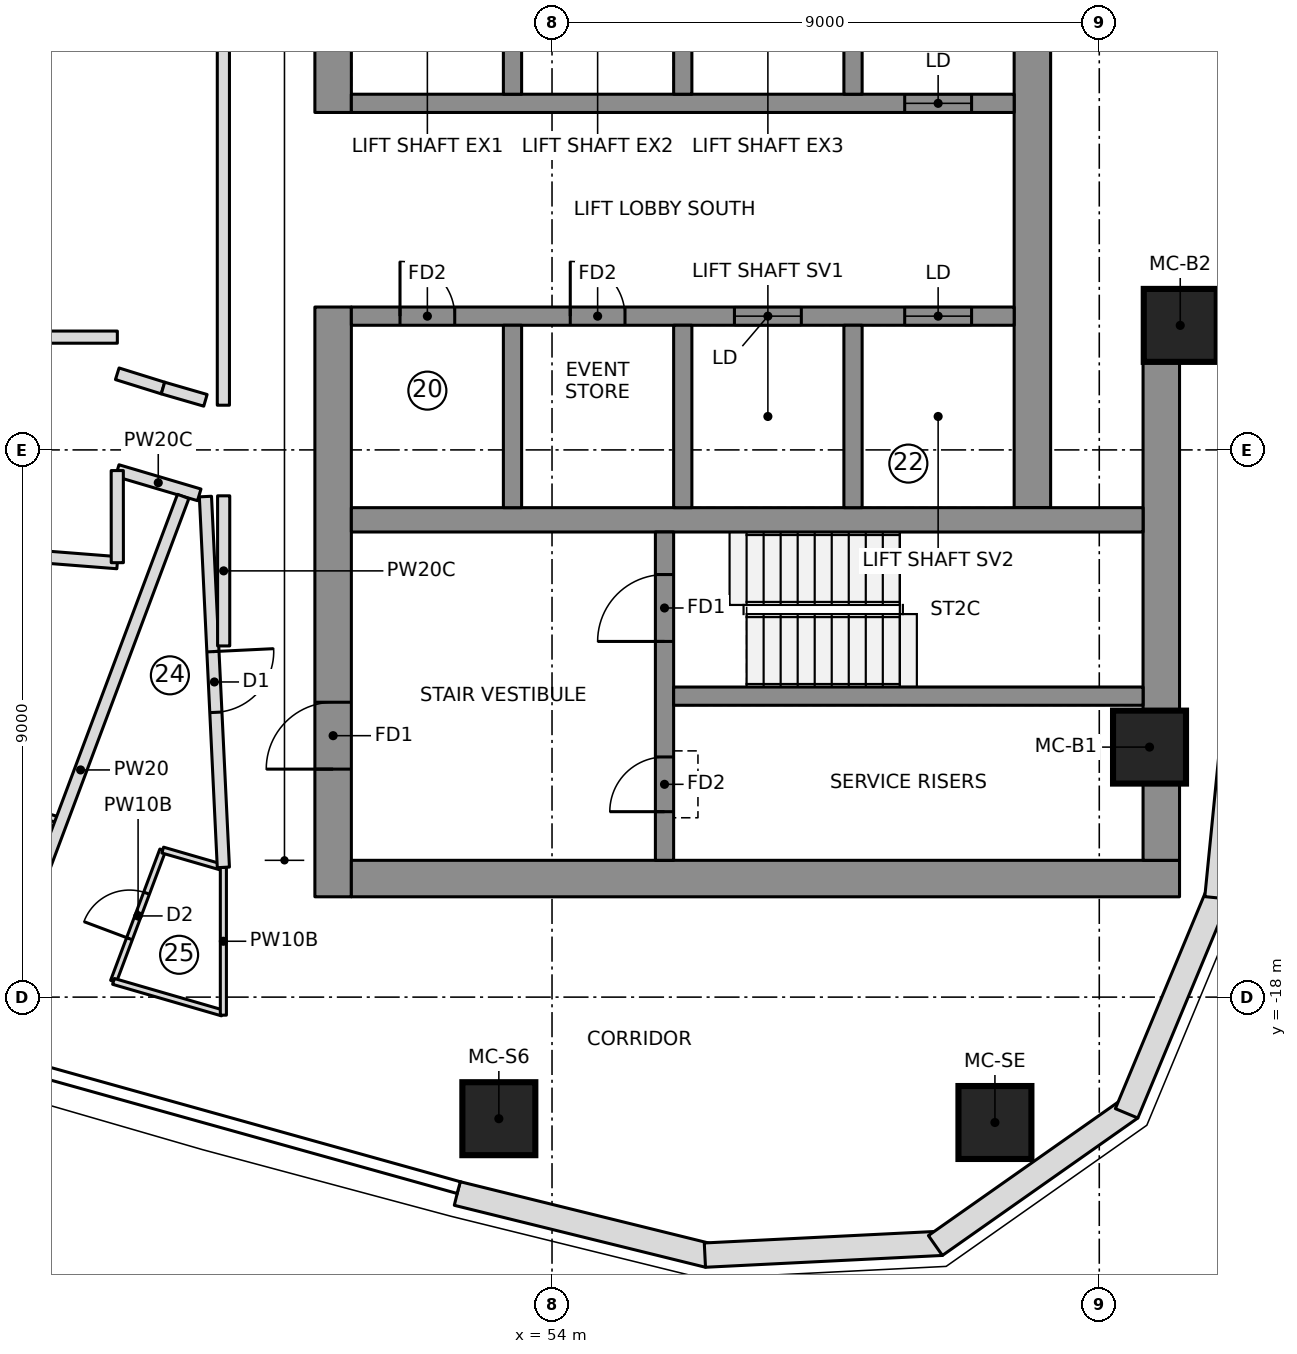
"""IFC4 building model, lengths in metres.
Left out: names, types, materials, properties, quantities, classifications, styles, units other than length and angle.
Written with IfcOpenShell. Run it as: python <this file> out.ifc"""

import sys

from ifc_helpers import new_model, si_unit, direction, frame, frame_2d, origin, origin_2d, place, context, subcontext, project, spatial, polyline, rectangle, outline, extrude, element, fill, save


model = new_model("IFC4")
c1 = context("Model", 3, precision=1e-05, world=origin(), true_north=direction((0.0, 1.0)))
c2 = subcontext(c1, "Body", "Model", "MODEL_VIEW")
j1 = project(units=[si_unit("LENGTHUNIT", "METRE"), si_unit("PLANEANGLEUNIT", "RADIAN")], contexts=[c1])
p1 = place(None, origin())
s1 = spatial("IfcSite", under=j1, at=p1, CompositionType="ELEMENT")
p2 = place(p1, origin())
s2 = spatial("IfcBuilding", under=s1, at=p2, CompositionType="ELEMENT")
p3 = place(p2, frame((0.0, 0.0, 252.75)))
s3 = spatial("IfcBuildingStorey", under=s2, at=p3, CompositionType="ELEMENT", Elevation=252.75)
p4 = place(p3, frame((50.4, -3.45, 0.0), z_axis=(0.0, 0.0, 1.0), x_axis=(0.0, 1.0, 0.0)))
e1 = element("IfcWall", 1, at=p4, inside=s3, PredefinedType="SHEAR", context=c2, shape_type="SweptSolid", body=[
    extrude(rectangle(XDim=6.9, YDim=0.6, at=frame_2d((3.45, 0.0))), origin(), (0.0, 0.0, 1.0), 3.55),
])
p5 = place(p3, frame((50.4, -16.35, 0.0), z_axis=(0.0, 0.0, 1.0), x_axis=(0.0, 1.0, 0.0)))
e2 = element("IfcWall", 2, at=p5, inside=s3, PredefinedType="SHEAR", context=c2, shape_type="SweptSolid", body=[
    extrude(rectangle(XDim=9.7, YDim=0.6, at=frame_2d((4.85, 0.0))), origin(), (0.0, 0.0, 1.0), 3.55),
])
p6 = place(p5, frame((2.1, 0.0, 0.0)))
e3 = element("IfcOpeningElement", 3, at=p6, cuts=e2, PredefinedType="OPENING", context=c2, shape_type="SweptSolid", body=[
    extrude(rectangle(XDim=1.1, YDim=2.1, at=frame_2d((0.55, 1.05))), frame((0.0, 0.31, 0.0), z_axis=(0.0, -1.0, 0.0), x_axis=(1.0, 0.0, 0.0)), (0.0, 0.0, 1.0), 0.62),
])
p7 = place(p3, frame((50.7, -16.05, 0.0), z_axis=(0.0, 0.0, 1.0), x_axis=(1.0, 0.0, 0.0)))
e4 = element("IfcWall", 4, at=p7, inside=s3, PredefinedType="SHEAR", context=c2, shape_type="SweptSolid", body=[
    extrude(rectangle(XDim=13.62, YDim=0.6, at=frame_2d((6.81, 0.0))), origin(), (0.0, 0.0, 1.0), 3.55),
])
p8 = place(p3, frame((64.02, -15.75, 0.0), z_axis=(0.0, 0.0, 1.0), x_axis=(0.0, 1.0, 0.0)))
e5 = element("IfcWall", 5, at=p8, inside=s3, PredefinedType="SHEAR", context=c2, shape_type="SweptSolid", body=[
    extrude(rectangle(XDim=8.248, YDim=0.6, at=frame_2d((4.124, 0.0))), origin(), (0.0, 0.0, 1.0), 3.55),
])
p9 = place(p3, frame((61.9, -9.95, 0.0), z_axis=(0.0, 0.0, 1.0), x_axis=(0.0, 1.0, 0.0)))
e6 = element("IfcWall", 6, at=p9, inside=s3, PredefinedType="SHEAR", context=c2, shape_type="SweptSolid", body=[
    extrude(rectangle(XDim=19.9, YDim=0.6, at=frame_2d((9.95, 0.0))), origin(), (0.0, 0.0, 1.0), 3.55),
])
p10 = place(p3, frame((50.7, -10.15, 0.0), z_axis=(0.0, 0.0, 1.0), x_axis=(1.0, 0.0, 0.0)))
e7 = element("IfcWall", 7, at=p10, inside=s3, PredefinedType="SHEAR", context=c2, shape_type="SweptSolid", body=[
    extrude(rectangle(XDim=13.02, YDim=0.4, at=frame_2d((6.51, 0.0))), origin(), (0.0, 0.0, 1.0), 3.55),
])
p11 = place(p3, frame((50.7, -3.3, 0.0), z_axis=(0.0, 0.0, 1.0), x_axis=(1.0, 0.0, 0.0)))
e8 = element("IfcWall", 8, at=p11, inside=s3, PredefinedType="SHEAR", context=c2, shape_type="SweptSolid", body=[
    extrude(rectangle(XDim=10.9, YDim=0.3, at=frame_2d((5.45, 0.0))), origin(), (0.0, 0.0, 1.0), 3.55),
])
p12 = place(p11, frame((9.1, 0.0, 0.0)))
e9 = element("IfcOpeningElement", 9, at=p12, cuts=e8, PredefinedType="OPENING", context=c2, shape_type="SweptSolid", body=[
    extrude(rectangle(XDim=1.1, YDim=2.1, at=frame_2d((0.55, 1.05))), frame((0.0, 0.16, 0.0), z_axis=(0.0, -1.0, 0.0), x_axis=(1.0, 0.0, 0.0)), (0.0, 0.0, 1.0), 0.32),
])
p13 = place(p3, frame((50.7, -6.8, 0.0), z_axis=(0.0, 0.0, 1.0), x_axis=(1.0, 0.0, 0.0)))
e10 = element("IfcWall", 10, at=p13, inside=s3, PredefinedType="SHEAR", context=c2, shape_type="SweptSolid", body=[
    extrude(rectangle(XDim=10.9, YDim=0.3, at=frame_2d((5.45, 0.0))), origin(), (0.0, 0.0, 1.0), 3.55),
])
p14 = place(p13, frame((6.3, 0.0, 0.0)))
e11 = element("IfcOpeningElement", 11, at=p14, cuts=e10, PredefinedType="OPENING", context=c2, shape_type="SweptSolid", body=[
    extrude(rectangle(XDim=1.1, YDim=2.1, at=frame_2d((0.55, 1.05))), frame((0.0, 0.16, 0.0), z_axis=(0.0, -1.0, 0.0), x_axis=(1.0, 0.0, 0.0)), (0.0, 0.0, 1.0), 0.32),
])
p15 = place(p13, frame((9.1, 0.0, 0.0)))
e12 = element("IfcOpeningElement", 12, at=p15, cuts=e10, PredefinedType="OPENING", context=c2, shape_type="SweptSolid", body=[
    extrude(rectangle(XDim=1.1, YDim=2.1, at=frame_2d((0.55, 1.05))), frame((0.0, 0.16, 0.0), z_axis=(0.0, -1.0, 0.0), x_axis=(1.0, 0.0, 0.0)), (0.0, 0.0, 1.0), 0.32),
])
p16 = place(p13, frame((0.8, 0.0, 0.0)))
e13 = element("IfcOpeningElement", 13, at=p16, cuts=e10, PredefinedType="OPENING", context=c2, shape_type="SweptSolid", body=[
    extrude(rectangle(XDim=0.9, YDim=2.1, at=frame_2d((0.45, 1.05))), frame((0.0, 0.16, 0.0), z_axis=(0.0, -1.0, 0.0), x_axis=(1.0, 0.0, 0.0)), (0.0, 0.0, 1.0), 0.32),
])
p17 = place(p13, frame((3.6, 0.0, 0.0)))
e14 = element("IfcOpeningElement", 14, at=p17, cuts=e10, PredefinedType="OPENING", context=c2, shape_type="SweptSolid", body=[
    extrude(rectangle(XDim=0.9, YDim=2.1, at=frame_2d((0.45, 1.05))), frame((0.0, 0.16, 0.0), z_axis=(0.0, -1.0, 0.0), x_axis=(1.0, 0.0, 0.0)), (0.0, 0.0, 1.0), 0.32),
])
for number, where, z_axis, x_axis in (
    (15, (53.35, -3.15, 0.0), (0.0, 0.0, 1.0), (0.0, 1.0, 0.0)),
    (16, (53.35, -9.95, 0.0), (0.0, 0.0, 1.0), (0.0, 1.0, 0.0)),
    (17, (56.15, -3.15, 0.0), (0.0, 0.0, 1.0), (0.0, 1.0, 0.0)),
    (18, (56.15, -9.95, 0.0), (0.0, 0.0, 1.0), (0.0, 1.0, 0.0)),
    (19, (58.95, -3.15, 0.0), (0.0, 0.0, 1.0), (0.0, 1.0, 0.0)),
    (20, (58.95, -9.95, 0.0), (0.0, 0.0, 1.0), (0.0, 1.0, 0.0)),
):
    element("IfcWall", number, at=place(p3, frame(where, z_axis=z_axis, x_axis=x_axis)), inside=s3, PredefinedType="SHEAR", context=c2, shape_type="SweptSolid", body=[
        extrude(rectangle(XDim=3.0, YDim=0.3, at=frame_2d((1.5, 0.0))), origin(), (0.0, 0.0, 1.0), 3.55),
    ])
p18 = place(p3, frame((55.85, -15.75, 0.0), z_axis=(0.0, 0.0, 1.0), x_axis=(0.0, 1.0, 0.0)))
e21 = element("IfcWall", 21, at=p18, inside=s3, PredefinedType="SHEAR", context=c2, shape_type="SweptSolid", body=[
    extrude(rectangle(XDim=5.4, YDim=0.3, at=frame_2d((2.7, 0.0))), origin(), (0.0, 0.0, 1.0), 3.55),
])
p19 = place(p18, frame((3.6, 0.0, 0.0)))
e22 = element("IfcOpeningElement", 22, at=p19, cuts=e21, PredefinedType="OPENING", context=c2, shape_type="SweptSolid", body=[
    extrude(rectangle(XDim=1.1, YDim=2.1, at=frame_2d((0.55, 1.05))), frame((0.0, 0.16, 0.0), z_axis=(0.0, -1.0, 0.0), x_axis=(1.0, 0.0, 0.0)), (0.0, 0.0, 1.0), 0.32),
])
p20 = place(p18, frame((0.8, 0.0, 0.0)))
e23 = element("IfcOpeningElement", 23, at=p20, cuts=e21, PredefinedType="OPENING", context=c2, shape_type="SweptSolid", body=[
    extrude(rectangle(XDim=0.9, YDim=2.1, at=frame_2d((0.45, 1.05))), frame((0.0, 0.16, 0.0), z_axis=(0.0, -1.0, 0.0), x_axis=(1.0, 0.0, 0.0)), (0.0, 0.0, 1.0), 0.32),
])
p21 = place(p3, frame((56.0, -13.05, 0.0), z_axis=(0.0, 0.0, 1.0), x_axis=(1.0, 0.0, 0.0)))
e24 = element("IfcWall", 24, at=p21, inside=s3, PredefinedType="SHEAR", context=c2, shape_type="SweptSolid", body=[
    extrude(rectangle(XDim=7.72, YDim=0.3, at=frame_2d((3.86, 0.0))), origin(), (0.0, 0.0, 1.0), 3.55),
])
for number, where, z_axis, x_axis in (
    (25, (53.125, -20.0, 0.0), (0.0, 0.0, 1.0), (1.0, 0.0, 0.0)),
    (26, (61.284, -20.062, 0.0), (0.0, 0.0, 1.0), (1.0, 0.0, 0.0)),
    (27, (63.826, -13.888, 0.0), (0.0, 0.0, 1.0), (1.0, 0.0, 0.0)),
    (28, (64.332, -6.952, 0.0), (0.0, 0.0, 1.0), (1.0, 0.0, 0.0)),
):
    element("IfcColumn", number, at=place(p3, frame(where, z_axis=z_axis, x_axis=x_axis)), inside=s3, PredefinedType="COLUMN", context=c2, shape_type="SweptSolid", body=[
        extrude(rectangle(XDim=1.2, YDim=1.2, at=origin_2d()), origin(), (0.0, 0.0, 1.0), 3.55),
    ])
p22 = place(p3, frame((52.441, -21.23, 0.0), z_axis=(0.0, 0.0, 1.0), x_axis=(0.970902342456, -0.23947576373, 0.0)))
e29 = element("IfcWall", 29, at=p22, inside=s3, PredefinedType="NOTDEFINED", context=c2, shape_type="SweptSolid", body=[
    extrude(outline(polyline([(0.0, -0.2), (4.255, -0.2), (4.197, 0.2), (0.0, 0.2), (0.0, -0.2)])), origin(), (0.0, 0.0, 1.0), 3.25),
])
p23 = place(p3, frame((56.543, -22.242, 0.0), z_axis=(0.0, 0.0, 1.0), x_axis=(0.998758875872, 0.049806705046, 0.0)))
e30 = element("IfcWall", 30, at=p23, inside=s3, PredefinedType="NOTDEFINED", context=c2, shape_type="SweptSolid", body=[
    extrude(outline(polyline([(-0.029, -0.2), (3.871, -0.2), (3.756, 0.2), (0.029, 0.2), (-0.029, -0.2)])), origin(), (0.0, 0.0, 1.0), 3.25),
])
p24 = place(p3, frame((60.352, -22.052, 0.0), z_axis=(0.0, 0.0, 1.0), x_axis=(0.817942545532, 0.575299915009, 0.0)))
e31 = element("IfcWall", 31, at=p24, inside=s3, PredefinedType="NOTDEFINED", context=c2, shape_type="SweptSolid", body=[
    extrude(outline(polyline([(-0.058, -0.2), (3.871, -0.2), (3.756, 0.2), (0.058, 0.2), (-0.058, -0.2)])), origin(), (0.0, 0.0, 1.0), 3.25),
])
p25 = place(p3, frame((63.471, -19.858, 0.0), z_axis=(0.0, 0.0, 1.0), x_axis=(0.3844335483, 0.923152667191, 0.0)))
e32 = element("IfcWall", 32, at=p25, inside=s3, PredefinedType="NOTDEFINED", context=c2, shape_type="SweptSolid", body=[
    extrude(outline(polyline([(-0.058, -0.2), (3.843, -0.2), (3.784, 0.2), (0.058, 0.2), (-0.058, -0.2)])), origin(), (0.0, 0.0, 1.0), 3.25),
])
p26 = place(p3, frame((64.938, -16.337, 0.0), z_axis=(0.0, 0.0, 1.0), x_axis=(0.098718218066, 0.995115427185, 0.0)))
e33 = element("IfcWall", 33, at=p26, inside=s3, PredefinedType="NOTDEFINED", context=c2, shape_type="SweptSolid", body=[
    extrude(outline(polyline([(-0.03, -0.2), (4.096, -0.2), (4.09, 0.2), (0.03, 0.2), (-0.03, -0.2)])), origin(), (0.0, 0.0, 1.0), 3.25),
])
p27 = place(p3, frame((46.85, -9.34, 0.0), z_axis=(0.0, 0.0, 1.0), x_axis=(0.958866391875, -0.283857785753, 0.0)))
e34 = element("IfcWall", 34, at=p27, inside=s3, PredefinedType="PARTITIONING", context=c2, shape_type="SweptSolid", body=[
    extrude(rectangle(XDim=1.406, YDim=0.2, at=frame_2d((0.703, 0.0))), origin(), (0.0, 0.0, 1.0), 3.15),
])
p28 = place(p3, frame((45.499, -14.973, 0.0), z_axis=(0.0, 0.0, 1.0), x_axis=(0.960560469191, -0.278071186978, 0.0)))
e35 = element("IfcWall", 35, at=p28, inside=s3, PredefinedType="PARTITIONING", context=c2, shape_type="SweptSolid", body=[
    extrude(rectangle(XDim=0.452, YDim=0.1, at=frame_2d((0.226, 0.0))), origin(), (0.0, 0.0, 1.0), 3.15),
])
p29 = place(p3, frame((44.56, -18.762, 0.0), z_axis=(0.0, 0.0, 1.0), x_axis=(0.35112901071, 0.936327089129, 0.0)))
e36 = element("IfcWall", 36, at=p29, inside=s3, PredefinedType="PARTITIONING", context=c2, shape_type="SweptSolid", body=[
    extrude(rectangle(XDim=9.608, YDim=0.2, at=frame_2d((4.804, 0.0))), origin(), (0.0, 0.0, 1.0), 3.15),
])
p30 = place(p3, frame((46.788, -17.741, 0.0), z_axis=(0.0, 0.0, 1.0), x_axis=(0.351158236187, 0.936316128857, 0.0)))
e37 = element("IfcWall", 37, at=p30, inside=s3, PredefinedType="PARTITIONING", context=c2, shape_type="SweptSolid", body=[
    extrude(rectangle(XDim=2.307, YDim=0.1, at=frame_2d((1.153, 0.0))), origin(), (0.0, 0.0, 1.0), 3.15),
])
p31 = place(p30, frame((0.75, 0.0, 0.0)))
e38 = element("IfcOpeningElement", 38, at=p31, cuts=e37, PredefinedType="OPENING", context=c2, shape_type="SweptSolid", body=[
    extrude(rectangle(XDim=0.8, YDim=2.1, at=frame_2d((0.4, 1.05))), frame((0.0, 0.06, 0.0), z_axis=(0.0, -1.0, 0.0), x_axis=(1.0, 0.0, 0.0)), (0.0, 0.0, 1.0), 0.12),
])
p32 = place(p3, frame((47.598, -15.582, 0.0), z_axis=(0.0, 0.0, 1.0), x_axis=(0.960468222897, -0.278389642057, 0.0)))
e39 = element("IfcWall", 39, at=p32, inside=s3, PredefinedType="PARTITIONING", context=c2, shape_type="SweptSolid", body=[
    extrude(rectangle(XDim=1.019, YDim=0.1, at=frame_2d((0.51, 0.0))), origin(), (0.0, 0.0, 1.0), 3.15),
])
p33 = place(p3, frame((48.578, -18.26, 0.0), z_axis=(0.0, 0.0, 1.0), x_axis=(-0.960473980386, 0.278369777458, 0.0)))
e40 = element("IfcWall", 40, at=p33, inside=s3, PredefinedType="PARTITIONING", context=c2, shape_type="SweptSolid", body=[
    extrude(rectangle(XDim=1.864, YDim=0.1, at=frame_2d((0.932, 0.0))), origin(), (0.0, 0.0, 1.0), 3.15),
])
p34 = place(p3, frame((47.602, -7.982, 0.0), z_axis=(0.0, 0.0, 1.0), x_axis=(-0.95461224237, 0.297851417181, 0.0)))
e41 = element("IfcWall", 41, at=p34, inside=s3, PredefinedType="PARTITIONING", context=c2, shape_type="SweptSolid", body=[
    extrude(rectangle(XDim=0.788, YDim=0.2, at=frame_2d((0.394, 0.0))), origin(), (0.0, 0.0, 1.0), 3.15),
])
p35 = place(p3, frame((48.595, -15.866, 0.0), z_axis=(0.0, 0.0, 1.0), x_axis=(0.0, -1.0, 0.0)))
e42 = element("IfcWall", 42, at=p35, inside=s3, PredefinedType="PARTITIONING", context=c2, shape_type="SweptSolid", body=[
    extrude(rectangle(XDim=2.431, YDim=0.1, at=frame_2d((1.215, 0.0))), origin(), (0.0, 0.0, 1.0), 3.15),
])
p36 = place(p3, frame((48.3, -8.185, 0.0), z_axis=(0.0, 0.0, 1.0), x_axis=(-0.960439023181, 0.278490363839, 0.0)))
e43 = element("IfcWall", 43, at=p36, inside=s3, PredefinedType="PARTITIONING", context=c2, shape_type="SweptSolid", body=[
    extrude(rectangle(XDim=0.727, YDim=0.2, at=frame_2d((0.363, 0.0))), origin(), (0.0, 0.0, 1.0), 3.15),
])
p37 = place(p3, frame((43.158, -10.565, 0.0), z_axis=(0.0, 0.0, 1.0), x_axis=(0.996940593543, -0.078162989617, 0.0)))
e44 = element("IfcWall", 44, at=p37, inside=s3, PredefinedType="PARTITIONING", context=c2, shape_type="SweptSolid", body=[
    extrude(rectangle(XDim=3.704, YDim=0.2, at=frame_2d((1.852, 0.0))), origin(), (0.0, 0.0, 1.0), 3.15),
])
p38 = place(p37, frame((1.327, 0.0, 0.0)))
e45 = element("IfcOpeningElement", 45, at=p38, cuts=e44, PredefinedType="OPENING", context=c2, shape_type="SweptSolid", body=[
    extrude(rectangle(XDim=1.0, YDim=2.1, at=frame_2d((0.5, 1.05))), frame((0.0, 0.11, 0.0), z_axis=(0.0, -1.0, 0.0), x_axis=(1.0, 0.0, 0.0)), (0.0, 0.0, 1.0), 0.22),
])
p39 = place(p3, frame((48.3, -9.767, 0.0), z_axis=(0.0, 0.0, 1.0), x_axis=(0.048302241024, -0.998832765538, 0.0)))
e46 = element("IfcWall", 46, at=p39, inside=s3, PredefinedType="PARTITIONING", context=c2, shape_type="SweptSolid", body=[
    extrude(rectangle(XDim=6.106, YDim=0.2, at=frame_2d((3.053, 0.0))), origin(), (0.0, 0.0, 1.0), 3.15),
])
p40 = place(p39, frame((2.553, 0.0, 0.0)))
e47 = element("IfcOpeningElement", 47, at=p40, cuts=e46, PredefinedType="OPENING", context=c2, shape_type="SweptSolid", body=[
    extrude(rectangle(XDim=1.0, YDim=2.1, at=frame_2d((0.5, 1.05))), frame((0.0, 0.11, 0.0), z_axis=(0.0, -1.0, 0.0), x_axis=(1.0, 0.0, 0.0)), (0.0, 0.0, 1.0), 0.22),
])
p41 = place(p3, frame((48.595, 8.265, 0.0), z_axis=(0.0, 0.0, 1.0), x_axis=(0.0, -1.0, 0.0)))
e48 = element("IfcWall", 48, at=p41, inside=s3, PredefinedType="PARTITIONING", context=c2, shape_type="SweptSolid", body=[
    extrude(rectangle(XDim=16.53, YDim=0.2, at=frame_2d((8.265, 0.0))), origin(), (0.0, 0.0, 1.0), 3.15),
])
p42 = place(p3, frame((46.852, -7.145, 0.0), z_axis=(0.0, 0.0, 1.0), x_axis=(-0.99999999156, 0.000129920747, 0.0)))
e49 = element("IfcWall", 49, at=p42, inside=s3, PredefinedType="PARTITIONING", context=c2, shape_type="SweptSolid", body=[
    extrude(rectangle(XDim=1.879, YDim=0.2, at=frame_2d((0.939, 0.0))), origin(), (0.0, 0.0, 1.0), 3.15),
])
p43 = place(p3, frame((46.851, -10.855, 0.0), z_axis=(0.0, 0.0, 1.0), x_axis=(-0.000644641284, 0.999999792219, 0.0)))
e50 = element("IfcWall", 50, at=p43, inside=s3, PredefinedType="PARTITIONING", context=c2, shape_type="SweptSolid", body=[
    extrude(rectangle(XDim=1.515, YDim=0.2, at=frame_2d((0.757, 0.0))), origin(), (0.0, 0.0, 1.0), 3.15),
])
p44 = place(p3, frame((48.6, -12.224, 0.0), z_axis=(0.0, 0.0, 1.0), x_axis=(0.0, 1.0, 0.0)))
e51 = element("IfcWall", 51, at=p44, inside=s3, PredefinedType="PARTITIONING", context=c2, shape_type="SweptSolid", body=[
    extrude(rectangle(XDim=2.469, YDim=0.2, at=frame_2d((1.234, 0.0))), origin(), (0.0, 0.0, 1.0), 3.15),
])
p45 = place(p31, origin())
e52 = element("IfcDoor", 52, at=p45, inside=s3, OperationType="SINGLE_SWING_LEFT", PredefinedType="DOOR", context=c2, shape_type="SweptSolid", body=[
    extrude(rectangle(XDim=0.8, YDim=2.1, at=frame_2d((0.4, 1.05))), frame((0.0, 0.025, 0.0), z_axis=(0.0, -1.0, 0.0), x_axis=(1.0, 0.0, 0.0)), (0.0, 0.0, 1.0), 0.05),
])
fill(e38, e52)
p46 = place(p40, origin())
e53 = element("IfcDoor", 53, at=p46, inside=s3, OperationType="SINGLE_SWING_LEFT", PredefinedType="DOOR", context=c2, shape_type="SweptSolid", body=[
    extrude(rectangle(XDim=1.0, YDim=2.1, at=frame_2d((0.5, 1.05))), frame((0.0, 0.025, 0.0), z_axis=(0.0, -1.0, 0.0), x_axis=(1.0, 0.0, 0.0)), (0.0, 0.0, 1.0), 0.05),
])
fill(e47, e53)
p47 = place(p12, origin())
e54 = element("IfcDoor", 54, at=p47, inside=s3, OperationType="DOUBLE_DOOR_SLIDING", PredefinedType="DOOR", context=c2, shape_type="SweptSolid", body=[
    extrude(rectangle(XDim=1.1, YDim=2.1, at=frame_2d((0.55, 1.05))), frame((0.0, 0.025, 0.0), z_axis=(0.0, -1.0, 0.0), x_axis=(1.0, 0.0, 0.0)), (0.0, 0.0, 1.0), 0.05),
])
fill(e9, e54)
p48 = place(p14, origin())
e55 = element("IfcDoor", 55, at=p48, inside=s3, OperationType="DOUBLE_DOOR_SLIDING", PredefinedType="DOOR", context=c2, shape_type="SweptSolid", body=[
    extrude(rectangle(XDim=1.1, YDim=2.1, at=frame_2d((0.55, 1.05))), frame((0.0, 0.025, 0.0), z_axis=(0.0, -1.0, 0.0), x_axis=(1.0, 0.0, 0.0)), (0.0, 0.0, 1.0), 0.05),
])
fill(e11, e55)
p49 = place(p15, origin())
e56 = element("IfcDoor", 56, at=p49, inside=s3, OperationType="DOUBLE_DOOR_SLIDING", PredefinedType="DOOR", context=c2, shape_type="SweptSolid", body=[
    extrude(rectangle(XDim=1.1, YDim=2.1, at=frame_2d((0.55, 1.05))), frame((0.0, 0.025, 0.0), z_axis=(0.0, -1.0, 0.0), x_axis=(1.0, 0.0, 0.0)), (0.0, 0.0, 1.0), 0.05),
])
fill(e12, e56)
p50 = place(p19, origin())
e57 = element("IfcDoor", 57, at=p50, inside=s3, OperationType="SINGLE_SWING_RIGHT", PredefinedType="DOOR", context=c2, shape_type="SweptSolid", body=[
    extrude(rectangle(XDim=1.1, YDim=2.1, at=frame_2d((0.55, 1.05))), frame((0.0, 0.025, 0.0), z_axis=(0.0, -1.0, 0.0), x_axis=(1.0, 0.0, 0.0)), (0.0, 0.0, 1.0), 0.05),
])
fill(e22, e57)
p51 = place(p6, origin())
e58 = element("IfcDoor", 58, at=p51, inside=s3, OperationType="SINGLE_SWING_RIGHT", PredefinedType="DOOR", context=c2, shape_type="SweptSolid", body=[
    extrude(rectangle(XDim=1.1, YDim=2.1, at=frame_2d((0.55, 1.05))), frame((0.0, 0.025, 0.0), z_axis=(0.0, -1.0, 0.0), x_axis=(1.0, 0.0, 0.0)), (0.0, 0.0, 1.0), 0.05),
])
fill(e3, e58)
p52 = place(p20, origin())
e59 = element("IfcDoor", 59, at=p52, inside=s3, OperationType="SINGLE_SWING_LEFT", PredefinedType="DOOR", context=c2, shape_type="SweptSolid", body=[
    extrude(rectangle(XDim=0.9, YDim=2.1, at=frame_2d((0.45, 1.05))), frame((0.0, 0.025, 0.0), z_axis=(0.0, -1.0, 0.0), x_axis=(1.0, 0.0, 0.0)), (0.0, 0.0, 1.0), 0.05),
])
fill(e23, e59)
p53 = place(p16, origin())
e60 = element("IfcDoor", 60, at=p53, inside=s3, OperationType="SINGLE_SWING_LEFT", PredefinedType="DOOR", context=c2, shape_type="SweptSolid", body=[
    extrude(rectangle(XDim=0.9, YDim=2.1, at=frame_2d((0.45, 1.05))), frame((0.0, 0.025, 0.0), z_axis=(0.0, -1.0, 0.0), x_axis=(1.0, 0.0, 0.0)), (0.0, 0.0, 1.0), 0.05),
])
fill(e13, e60)
p54 = place(p17, origin())
e61 = element("IfcDoor", 61, at=p54, inside=s3, OperationType="SINGLE_SWING_LEFT", PredefinedType="DOOR", context=c2, shape_type="SweptSolid", body=[
    extrude(rectangle(XDim=0.9, YDim=2.1, at=frame_2d((0.45, 1.05))), frame((0.0, 0.025, 0.0), z_axis=(0.0, -1.0, 0.0), x_axis=(1.0, 0.0, 0.0)), (0.0, 0.0, 1.0), 0.05),
])
fill(e14, e61)
save(model, sys.argv[1])
